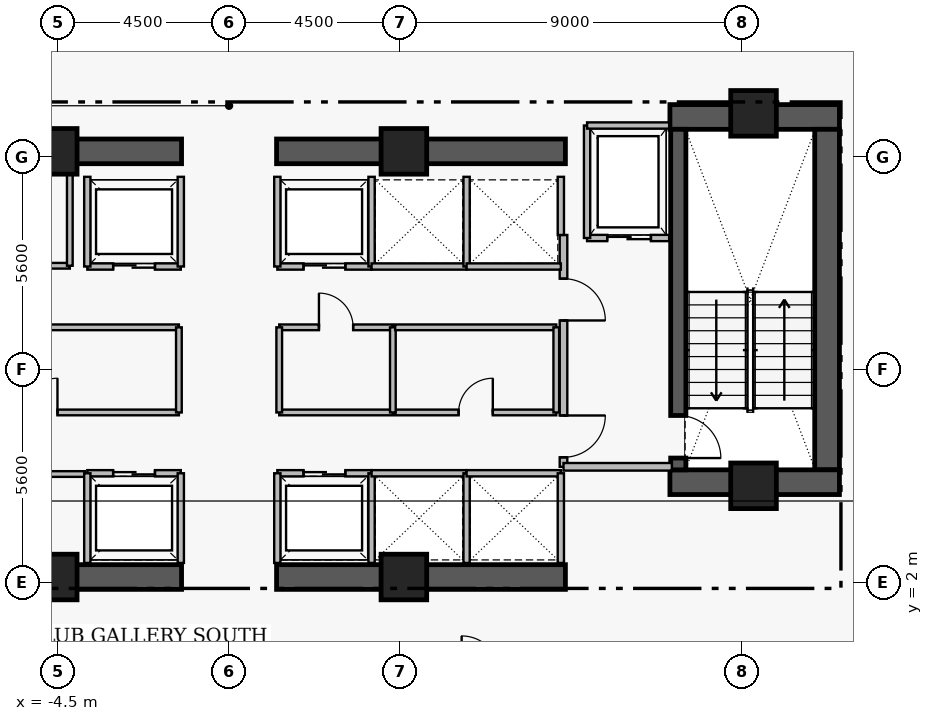
"""IFC4 building model, lengths in metres.
Left out: names, types, materials, properties, quantities, classifications, styles, units other than length and angle.
Written with IfcOpenShell. Run it as: python <this file> out.ifc"""

import sys

from ifc_helpers import new_model, si_unit, direction, frame, frame_2d, origin, origin_2d, place, context, subcontext, project, spatial, rectangle, extrude, element, fill, save


model = new_model("IFC4")
c1 = context("Model", 3, precision=1e-05, world=origin(), true_north=direction((0.0, 1.0)))
c2 = subcontext(c1, "Body", "Model", "MODEL_VIEW")
j1 = project(units=[si_unit("LENGTHUNIT", "METRE"), si_unit("PLANEANGLEUNIT", "RADIAN")], contexts=[c1])
p1 = place(None, origin())
s1 = spatial("IfcSite", under=j1, at=p1, CompositionType="ELEMENT")
p2 = place(p1, origin())
s2 = spatial("IfcBuilding", under=s1, at=p2, CompositionType="ELEMENT")
p3 = place(p2, frame((0.0, 0.0, 214.9)))
s3 = spatial("IfcBuildingStorey", under=s2, at=p3, CompositionType="ELEMENT", Elevation=214.9)
p4 = place(p3, frame((11.6, 14.255, 0.0), z_axis=(0.0, 0.0, 1.0), x_axis=(1.0, 0.0, 0.0)))
e1 = element("IfcWall", 1, at=p4, inside=s3, PredefinedType="SHEAR", context=c2, shape_type="SweptSolid", body=[
    extrude(rectangle(XDim=4.46, YDim=0.65, at=frame_2d((2.23, 0.0))), origin(), (0.0, 0.0, 1.0), 3.56),
])
p5 = place(p3, frame((15.735, 4.97, 0.0), z_axis=(0.0, 0.0, 1.0), x_axis=(0.0, 1.0, 0.0)))
e2 = element("IfcWall", 2, at=p5, inside=s3, PredefinedType="SHEAR", context=c2, shape_type="SweptSolid", body=[
    extrude(rectangle(XDim=8.96, YDim=0.65, at=frame_2d((4.48, 0.0))), origin(), (0.0, 0.0, 1.0), 3.56),
])
p6 = place(p3, frame((11.6, 4.645, 0.0), z_axis=(0.0, 0.0, 1.0), x_axis=(1.0, 0.0, 0.0)))
e3 = element("IfcWall", 3, at=p6, inside=s3, PredefinedType="SHEAR", context=c2, shape_type="SweptSolid", body=[
    extrude(rectangle(XDim=4.46, YDim=0.65, at=frame_2d((2.23, 0.0))), origin(), (0.0, 0.0, 1.0), 3.56),
])
for number, where, z_axis, x_axis in (
    (4, (-8.85, 2.15, 0.0), (0.0, 0.0, 1.0), (1.0, 0.0, 0.0)),
    (5, (1.25, 2.15, 0.0), (0.0, 0.0, 1.0), (1.0, 0.0, 0.0)),
    (6, (-8.85, 13.35, 0.0), (0.0, 0.0, 1.0), (1.0, 0.0, 0.0)),
    (7, (1.25, 13.35, 0.0), (0.0, 0.0, 1.0), (1.0, 0.0, 0.0)),
):
    element("IfcWall", number, at=place(p3, frame(where, z_axis=z_axis, x_axis=x_axis)), inside=s3, PredefinedType="SHEAR", context=c2, shape_type="SweptSolid", body=[
        extrude(rectangle(XDim=7.6, YDim=0.65, at=frame_2d((3.8, 0.0))), origin(), (0.0, 0.0, 1.0), 3.53),
    ])
p7 = place(p3, frame((11.82, 13.93, 0.0), z_axis=(0.0, 0.0, 1.0), x_axis=(0.0, -1.0, 0.0)))
e8 = element("IfcWall", 8, at=p7, inside=s3, PredefinedType="SHEAR", context=c2, shape_type="SweptSolid", body=[
    extrude(rectangle(XDim=8.96, YDim=0.4, at=frame_2d((4.48, 0.0))), origin(), (0.0, 0.0, 1.0), 3.56),
])
p8 = place(p7, frame((7.53, 0.0, 0.0)))
e9 = element("IfcOpeningElement", 9, at=p8, cuts=e8, PredefinedType="OPENING", context=c2, shape_type="SweptSolid", body=[
    extrude(rectangle(XDim=1.12, YDim=2.22, at=frame_2d((0.56, 1.11))), frame((0.0, 0.21, 0.0), z_axis=(0.0, -1.0, 0.0), x_axis=(1.0, 0.0, 0.0)), (0.0, 0.0, 1.0), 0.42),
])
for number, where, z_axis, x_axis in (
    (10, (-4.6, 13.35, 0.0), (0.0, 0.0, 1.0), (1.0, 0.0, 0.0)),
    (11, (4.6, 13.35, 0.0), (0.0, 0.0, 1.0), (1.0, 0.0, 0.0)),
    (12, (13.8, 14.35, 0.0), (0.0, 0.0, 1.0), (1.0, 0.0, 0.0)),
    (13, (-4.6, 2.15, 0.0), (0.0, 0.0, 1.0), (1.0, 0.0, 0.0)),
    (14, (4.6, 2.15, 0.0), (0.0, 0.0, 1.0), (1.0, 0.0, 0.0)),
    (15, (13.8, 4.55, 0.0), (0.0, 0.0, 1.0), (1.0, 0.0, 0.0)),
):
    element("IfcColumn", number, at=place(p3, frame(where, z_axis=z_axis, x_axis=x_axis)), inside=s3, PredefinedType="COLUMN", context=c2, shape_type="SweptSolid", body=[
        extrude(rectangle(XDim=1.2, YDim=1.2, at=origin_2d()), origin(), (0.0, 0.0, 1.0), 3.75),
    ])
p9 = place(p3, frame((8.8, 11.15, 0.0), z_axis=(0.0, 0.0, 1.0), x_axis=(0.0, -1.0, 0.0)))
e16 = element("IfcWall", 16, at=p9, inside=s3, PredefinedType="PARTITIONING", context=c2, shape_type="SweptSolid", body=[
    extrude(rectangle(XDim=6.1, YDim=0.2, at=frame_2d((3.05, 0.0))), origin(), (0.0, 0.0, 1.0), 3.53),
])
p10 = place(p9, frame((1.15, 0.0, 0.0)))
e17 = element("IfcOpeningElement", 17, at=p10, cuts=e16, PredefinedType="OPENING", context=c2, shape_type="SweptSolid", body=[
    extrude(rectangle(XDim=1.1, YDim=2.2, at=frame_2d((0.55, 1.1))), frame((0.0, 0.11, 0.0), z_axis=(0.0, -1.0, 0.0), x_axis=(1.0, 0.0, 0.0)), (0.0, 0.0, 1.0), 0.22),
])
p11 = place(p9, frame((4.75, 0.0, 0.0)))
e18 = element("IfcOpeningElement", 18, at=p11, cuts=e16, PredefinedType="OPENING", context=c2, shape_type="SweptSolid", body=[
    extrude(rectangle(XDim=1.1, YDim=2.2, at=frame_2d((0.55, 1.1))), frame((0.0, 0.11, 0.0), z_axis=(0.0, -1.0, 0.0), x_axis=(1.0, 0.0, 0.0)), (0.0, 0.0, 1.0), 0.22),
])
p12 = place(p3, frame((9.42, 11.07, 0.0), z_axis=(0.0, 0.0, 1.0), x_axis=(1.0, 0.0, 0.0)))
e19 = element("IfcWall", 19, at=p12, inside=s3, PredefinedType="PARTITIONING", context=c2, shape_type="SweptSolid", body=[
    extrude(rectangle(XDim=2.16, YDim=0.165, at=frame_2d((1.08, 0.0))), origin(), (0.0, 0.0, 1.0), 3.53),
])
p13 = place(p12, frame((0.53, 0.0, 0.0)))
e20 = element("IfcOpeningElement", 20, at=p13, cuts=e19, PredefinedType="OPENING", context=c2, shape_type="SweptSolid", body=[
    extrude(rectangle(XDim=1.15, YDim=2.25, at=frame_2d((0.575, 1.125))), frame((0.0, 0.093, 0.0), z_axis=(0.0, -1.0, 0.0), x_axis=(1.0, 0.0, 0.0)), (0.0, 0.0, 1.0), 0.185),
])
p14 = place(p3, frame((-3.73, 4.88, 0.0), z_axis=(0.0, 0.0, 1.0), x_axis=(1.0, 0.0, 0.0)))
e21 = element("IfcWall", 21, at=p14, inside=s3, PredefinedType="PARTITIONING", context=c2, shape_type="SweptSolid", body=[
    extrude(rectangle(XDim=2.46, YDim=0.165, at=frame_2d((1.23, 0.0))), origin(), (0.0, 0.0, 1.0), 3.53),
])
p15 = place(p14, frame((0.68, 0.0, 0.0)))
e22 = element("IfcOpeningElement", 22, at=p15, cuts=e21, PredefinedType="OPENING", context=c2, shape_type="SweptSolid", body=[
    extrude(rectangle(XDim=1.1, YDim=2.25, at=frame_2d((0.55, 1.125))), frame((0.0, 0.093, 0.0), z_axis=(0.0, -1.0, 0.0), x_axis=(1.0, 0.0, 0.0)), (0.0, 0.0, 1.0), 0.185),
])
p16 = place(p3, frame((1.27, 4.88, 0.0), z_axis=(0.0, 0.0, 1.0), x_axis=(1.0, 0.0, 0.0)))
e23 = element("IfcWall", 23, at=p16, inside=s3, PredefinedType="PARTITIONING", context=c2, shape_type="SweptSolid", body=[
    extrude(rectangle(XDim=2.48, YDim=0.165, at=frame_2d((1.24, 0.0))), origin(), (0.0, 0.0, 1.0), 3.53),
])
p17 = place(p16, frame((0.69, 0.0, 0.0)))
e24 = element("IfcOpeningElement", 24, at=p17, cuts=e23, PredefinedType="OPENING", context=c2, shape_type="SweptSolid", body=[
    extrude(rectangle(XDim=1.1, YDim=2.25, at=frame_2d((0.55, 1.125))), frame((0.0, 0.093, 0.0), z_axis=(0.0, -1.0, 0.0), x_axis=(1.0, 0.0, 0.0)), (0.0, 0.0, 1.0), 0.185),
])
p18 = place(p3, frame((-3.73, 10.32, 0.0), z_axis=(0.0, 0.0, 1.0), x_axis=(1.0, 0.0, 0.0)))
e25 = element("IfcWall", 25, at=p18, inside=s3, PredefinedType="PARTITIONING", context=c2, shape_type="SweptSolid", body=[
    extrude(rectangle(XDim=2.46, YDim=0.165, at=frame_2d((1.23, 0.0))), origin(), (0.0, 0.0, 1.0), 3.53),
])
p19 = place(p18, frame((0.68, 0.0, 0.0)))
e26 = element("IfcOpeningElement", 26, at=p19, cuts=e25, PredefinedType="OPENING", context=c2, shape_type="SweptSolid", body=[
    extrude(rectangle(XDim=1.1, YDim=2.25, at=frame_2d((0.55, 1.125))), frame((0.0, 0.093, 0.0), z_axis=(0.0, -1.0, 0.0), x_axis=(1.0, 0.0, 0.0)), (0.0, 0.0, 1.0), 0.185),
])
p20 = place(p3, frame((1.27, 10.32, 0.0), z_axis=(0.0, 0.0, 1.0), x_axis=(1.0, 0.0, 0.0)))
e27 = element("IfcWall", 27, at=p20, inside=s3, PredefinedType="PARTITIONING", context=c2, shape_type="SweptSolid", body=[
    extrude(rectangle(XDim=2.48, YDim=0.165, at=frame_2d((1.24, 0.0))), origin(), (0.0, 0.0, 1.0), 3.53),
])
p21 = place(p20, frame((0.69, 0.0, 0.0)))
e28 = element("IfcOpeningElement", 28, at=p21, cuts=e27, PredefinedType="OPENING", context=c2, shape_type="SweptSolid", body=[
    extrude(rectangle(XDim=1.1, YDim=2.25, at=frame_2d((0.55, 1.125))), frame((0.0, 0.093, 0.0), z_axis=(0.0, -1.0, 0.0), x_axis=(1.0, 0.0, 0.0)), (0.0, 0.0, 1.0), 0.185),
])
p22 = place(p3, frame((-8.71, 4.86, 0.0), z_axis=(0.0, 0.0, 1.0), x_axis=(1.0, 0.0, 0.0)))
e29 = element("IfcWall", 29, at=p22, inside=s3, PredefinedType="PARTITIONING", context=c2, shape_type="SweptSolid", body=[
    extrude(rectangle(XDim=4.92, YDim=0.15, at=frame_2d((2.46, 0.0))), origin(), (0.0, 0.0, 1.0), 3.53),
])
p23 = place(p22, frame((2.01, 0.0, 0.0)))
e30 = element("IfcOpeningElement", 30, at=p23, cuts=e29, PredefinedType="OPENING", context=c2, shape_type="SweptSolid", body=[
    extrude(rectangle(XDim=0.9, YDim=2.15, at=frame_2d((0.45, 1.075))), frame((0.0, 0.085, 0.0), z_axis=(0.0, -1.0, 0.0), x_axis=(1.0, 0.0, 0.0)), (0.0, 0.0, 1.0), 0.17),
])
p24 = place(p3, frame((-8.71, 10.34, 0.0), z_axis=(0.0, 0.0, 1.0), x_axis=(1.0, 0.0, 0.0)))
e31 = element("IfcWall", 31, at=p24, inside=s3, PredefinedType="PARTITIONING", context=c2, shape_type="SweptSolid", body=[
    extrude(rectangle(XDim=4.52, YDim=0.15, at=frame_2d((2.26, 0.0))), origin(), (0.0, 0.0, 1.0), 3.53),
])
p25 = place(p24, frame((1.81, 0.0, 0.0)))
e32 = element("IfcOpeningElement", 32, at=p25, cuts=e31, PredefinedType="OPENING", context=c2, shape_type="SweptSolid", body=[
    extrude(rectangle(XDim=0.9, YDim=2.15, at=frame_2d((0.45, 1.075))), frame((0.0, 0.085, 0.0), z_axis=(0.0, -1.0, 0.0), x_axis=(1.0, 0.0, 0.0)), (0.0, 0.0, 1.0), 0.17),
])
p26 = place(p3, frame((-8.61, 6.48, 0.0), z_axis=(0.0, 0.0, 1.0), x_axis=(1.0, 0.0, 0.0)))
e33 = element("IfcWall", 33, at=p26, inside=s3, PredefinedType="PARTITIONING", context=c2, shape_type="SweptSolid", body=[
    extrude(rectangle(XDim=7.29, YDim=0.15, at=frame_2d((3.645, 0.0))), origin(), (0.0, 0.0, 1.0), 3.53),
])
p27 = place(p26, frame((3.195, 0.0, 0.0)))
e34 = element("IfcOpeningElement", 34, at=p27, cuts=e33, PredefinedType="OPENING", context=c2, shape_type="SweptSolid", body=[
    extrude(rectangle(XDim=0.9, YDim=2.15, at=frame_2d((0.45, 1.075))), frame((0.0, 0.085, 0.0), z_axis=(0.0, -1.0, 0.0), x_axis=(1.0, 0.0, 0.0)), (0.0, 0.0, 1.0), 0.17),
])
p28 = place(p3, frame((1.32, 8.72, 0.0), z_axis=(0.0, 0.0, 1.0), x_axis=(1.0, 0.0, 0.0)))
e35 = element("IfcWall", 35, at=p28, inside=s3, PredefinedType="PARTITIONING", context=c2, shape_type="SweptSolid", body=[
    extrude(rectangle(XDim=2.99, YDim=0.15, at=frame_2d((1.495, 0.0))), origin(), (0.0, 0.0, 1.0), 3.53),
])
p29 = place(p28, frame((1.045, 0.0, 0.0)))
e36 = element("IfcOpeningElement", 36, at=p29, cuts=e35, PredefinedType="OPENING", context=c2, shape_type="SweptSolid", body=[
    extrude(rectangle(XDim=0.9, YDim=2.15, at=frame_2d((0.45, 1.075))), frame((0.0, 0.085, 0.0), z_axis=(0.0, -1.0, 0.0), x_axis=(1.0, 0.0, 0.0)), (0.0, 0.0, 1.0), 0.17),
])
p30 = place(p3, frame((4.37, 6.48, 0.0), z_axis=(0.0, 0.0, 1.0), x_axis=(1.0, 0.0, 0.0)))
e37 = element("IfcWall", 37, at=p30, inside=s3, PredefinedType="PARTITIONING", context=c2, shape_type="SweptSolid", body=[
    extrude(rectangle(XDim=4.24, YDim=0.15, at=frame_2d((2.12, 0.0))), origin(), (0.0, 0.0, 1.0), 3.53),
])
p31 = place(p30, frame((1.67, 0.0, 0.0)))
e38 = element("IfcOpeningElement", 38, at=p31, cuts=e37, PredefinedType="OPENING", context=c2, shape_type="SweptSolid", body=[
    extrude(rectangle(XDim=0.9, YDim=2.15, at=frame_2d((0.45, 1.075))), frame((0.0, 0.085, 0.0), z_axis=(0.0, -1.0, 0.0), x_axis=(1.0, 0.0, 0.0)), (0.0, 0.0, 1.0), 0.17),
])
p32 = place(p3, frame((8.8, 5.05, 0.0), z_axis=(0.0, 0.0, 1.0), x_axis=(1.0, 0.0, 0.0)))
e39 = element("IfcWall", 39, at=p32, inside=s3, PredefinedType="PARTITIONING", context=c2, shape_type="SweptSolid", body=[
    extrude(rectangle(XDim=2.85, YDim=0.2, at=frame_2d((1.425, 0.0))), origin(), (0.0, 0.0, 1.0), 3.53),
])
p33 = place(p3, frame((9.42, 11.07, 0.0), z_axis=(0.0, 0.0, 1.0), x_axis=(0.0, 1.0, 0.0)))
e40 = element("IfcWall", 40, at=p33, inside=s3, PredefinedType="PARTITIONING", context=c2, shape_type="SweptSolid", body=[
    extrude(rectangle(XDim=2.96, YDim=0.165, at=frame_2d((1.48, 0.0))), origin(), (0.0, 0.0, 1.0), 3.53),
])
p34 = place(p3, frame((9.42, 14.03, 0.0), z_axis=(0.0, 0.0, 1.0), x_axis=(1.0, 0.0, 0.0)))
e41 = element("IfcWall", 41, at=p34, inside=s3, PredefinedType="PARTITIONING", context=c2, shape_type="SweptSolid", body=[
    extrude(rectangle(XDim=2.16, YDim=0.165, at=frame_2d((1.08, 0.0))), origin(), (0.0, 0.0, 1.0), 3.53),
])
for number, where, z_axis, x_axis in (
    (42, (-3.73, 2.52, 0.0), (0.0, 0.0, 1.0), (0.0, 1.0, 0.0)),
    (43, (-1.27, 2.52, 0.0), (0.0, 0.0, 1.0), (0.0, 1.0, 0.0)),
    (44, (1.27, 2.52, 0.0), (0.0, 0.0, 1.0), (0.0, 1.0, 0.0)),
    (45, (3.75, 2.52, 0.0), (0.0, 0.0, 1.0), (0.0, 1.0, 0.0)),
    (46, (-3.73, 10.32, 0.0), (0.0, 0.0, 1.0), (0.0, 1.0, 0.0)),
    (47, (-1.27, 10.32, 0.0), (0.0, 0.0, 1.0), (0.0, 1.0, 0.0)),
    (48, (1.27, 10.32, 0.0), (0.0, 0.0, 1.0), (0.0, 1.0, 0.0)),
    (49, (3.75, 10.32, 0.0), (0.0, 0.0, 1.0), (0.0, 1.0, 0.0)),
):
    element("IfcWall", number, at=place(p3, frame(where, z_axis=z_axis, x_axis=x_axis)), inside=s3, PredefinedType="PARTITIONING", context=c2, shape_type="SweptSolid", body=[
        extrude(rectangle(XDim=2.36, YDim=0.165, at=frame_2d((1.18, 0.0))), origin(), (0.0, 0.0, 1.0), 3.53),
    ])
p35 = place(p3, frame((3.75, 4.88, 0.0), z_axis=(0.0, 0.0, 1.0), x_axis=(1.0, 0.0, 0.0)))
e50 = element("IfcWall", 50, at=p35, inside=s3, PredefinedType="PARTITIONING", context=c2, shape_type="SweptSolid", body=[
    extrude(rectangle(XDim=2.5, YDim=0.165, at=frame_2d((1.25, 0.0))), origin(), (0.0, 0.0, 1.0), 3.53),
])
p36 = place(p3, frame((6.25, 2.52, 0.0), z_axis=(0.0, 0.0, 1.0), x_axis=(0.0, 1.0, 0.0)))
e51 = element("IfcWall", 51, at=p36, inside=s3, PredefinedType="PARTITIONING", context=c2, shape_type="SweptSolid", body=[
    extrude(rectangle(XDim=2.36, YDim=0.165, at=frame_2d((1.18, 0.0))), origin(), (0.0, 0.0, 1.0), 3.53),
])
p37 = place(p3, frame((6.25, 4.88, 0.0), z_axis=(0.0, 0.0, 1.0), x_axis=(1.0, 0.0, 0.0)))
e52 = element("IfcWall", 52, at=p37, inside=s3, PredefinedType="PARTITIONING", context=c2, shape_type="SweptSolid", body=[
    extrude(rectangle(XDim=2.48, YDim=0.165, at=frame_2d((1.24, 0.0))), origin(), (0.0, 0.0, 1.0), 3.53),
])
p38 = place(p3, frame((8.73, 2.52, 0.0), z_axis=(0.0, 0.0, 1.0), x_axis=(0.0, 1.0, 0.0)))
e53 = element("IfcWall", 53, at=p38, inside=s3, PredefinedType="PARTITIONING", context=c2, shape_type="SweptSolid", body=[
    extrude(rectangle(XDim=2.36, YDim=0.165, at=frame_2d((1.18, 0.0))), origin(), (0.0, 0.0, 1.0), 3.53),
])
p39 = place(p3, frame((3.75, 10.32, 0.0), z_axis=(0.0, 0.0, 1.0), x_axis=(1.0, 0.0, 0.0)))
e54 = element("IfcWall", 54, at=p39, inside=s3, PredefinedType="PARTITIONING", context=c2, shape_type="SweptSolid", body=[
    extrude(rectangle(XDim=2.5, YDim=0.165, at=frame_2d((1.25, 0.0))), origin(), (0.0, 0.0, 1.0), 3.53),
])
p40 = place(p3, frame((6.25, 10.32, 0.0), z_axis=(0.0, 0.0, 1.0), x_axis=(0.0, 1.0, 0.0)))
e55 = element("IfcWall", 55, at=p40, inside=s3, PredefinedType="PARTITIONING", context=c2, shape_type="SweptSolid", body=[
    extrude(rectangle(XDim=2.36, YDim=0.165, at=frame_2d((1.18, 0.0))), origin(), (0.0, 0.0, 1.0), 3.53),
])
p41 = place(p3, frame((6.25, 10.32, 0.0), z_axis=(0.0, 0.0, 1.0), x_axis=(1.0, 0.0, 0.0)))
e56 = element("IfcWall", 56, at=p41, inside=s3, PredefinedType="PARTITIONING", context=c2, shape_type="SweptSolid", body=[
    extrude(rectangle(XDim=2.48, YDim=0.165, at=frame_2d((1.24, 0.0))), origin(), (0.0, 0.0, 1.0), 3.53),
])
p42 = place(p3, frame((8.73, 11.15, 0.0), z_axis=(0.0, 0.0, 1.0), x_axis=(0.0, 1.0, 0.0)))
e57 = element("IfcWall", 57, at=p42, inside=s3, PredefinedType="PARTITIONING", context=c2, shape_type="SweptSolid", body=[
    extrude(rectangle(XDim=1.53, YDim=0.165, at=frame_2d((0.765, 0.0))), origin(), (0.0, 0.0, 1.0), 3.53),
])
p43 = place(p3, frame((-4.19, 10.34, 0.0), z_axis=(0.0, 0.0, 1.0), x_axis=(0.0, 1.0, 0.0)))
e58 = element("IfcWall", 58, at=p43, inside=s3, PredefinedType="PARTITIONING", context=c2, shape_type="SweptSolid", body=[
    extrude(rectangle(XDim=2.52, YDim=0.15, at=frame_2d((1.26, 0.0))), origin(), (0.0, 0.0, 1.0), 3.53),
])
p44 = place(p3, frame((-8.61, 8.72, 0.0), z_axis=(0.0, 0.0, 1.0), x_axis=(1.0, 0.0, 0.0)))
e59 = element("IfcWall", 59, at=p44, inside=s3, PredefinedType="PARTITIONING", context=c2, shape_type="SweptSolid", body=[
    extrude(rectangle(XDim=7.29, YDim=0.15, at=frame_2d((3.645, 0.0))), origin(), (0.0, 0.0, 1.0), 3.53),
])
p45 = place(p3, frame((-1.32, 6.48, 0.0), z_axis=(0.0, 0.0, 1.0), x_axis=(0.0, 1.0, 0.0)))
e60 = element("IfcWall", 60, at=p45, inside=s3, PredefinedType="PARTITIONING", context=c2, shape_type="SweptSolid", body=[
    extrude(rectangle(XDim=2.24, YDim=0.15, at=frame_2d((1.12, 0.0))), origin(), (0.0, 0.0, 1.0), 3.53),
])
p46 = place(p3, frame((1.32, 6.48, 0.0), z_axis=(0.0, 0.0, 1.0), x_axis=(1.0, 0.0, 0.0)))
e61 = element("IfcWall", 61, at=p46, inside=s3, PredefinedType="PARTITIONING", context=c2, shape_type="SweptSolid", body=[
    extrude(rectangle(XDim=2.99, YDim=0.15, at=frame_2d((1.495, 0.0))), origin(), (0.0, 0.0, 1.0), 3.53),
])
for number, where, z_axis, x_axis in (
    (62, (1.32, 6.48, 0.0), (0.0, 0.0, 1.0), (0.0, 1.0, 0.0)),
    (63, (4.31, 6.48, 0.0), (0.0, 0.0, 1.0), (0.0, 1.0, 0.0)),
):
    element("IfcWall", number, at=place(p3, frame(where, z_axis=z_axis, x_axis=x_axis)), inside=s3, PredefinedType="PARTITIONING", context=c2, shape_type="SweptSolid", body=[
        extrude(rectangle(XDim=2.24, YDim=0.15, at=frame_2d((1.12, 0.0))), origin(), (0.0, 0.0, 1.0), 3.53),
    ])
p47 = place(p3, frame((4.37, 8.72, 0.0), z_axis=(0.0, 0.0, 1.0), x_axis=(1.0, 0.0, 0.0)))
e64 = element("IfcWall", 64, at=p47, inside=s3, PredefinedType="PARTITIONING", context=c2, shape_type="SweptSolid", body=[
    extrude(rectangle(XDim=4.24, YDim=0.15, at=frame_2d((2.12, 0.0))), origin(), (0.0, 0.0, 1.0), 3.53),
])
p48 = place(p3, frame((8.61, 6.48, 0.0), z_axis=(0.0, 0.0, 1.0), x_axis=(0.0, 1.0, 0.0)))
e65 = element("IfcWall", 65, at=p48, inside=s3, PredefinedType="PARTITIONING", context=c2, shape_type="SweptSolid", body=[
    extrude(rectangle(XDim=2.24, YDim=0.15, at=frame_2d((1.12, 0.0))), origin(), (0.0, 0.0, 1.0), 3.53),
])
p49 = place(p8, origin())
e66 = element("IfcDoor", 66, at=p49, inside=s3, OperationType="SINGLE_SWING_RIGHT", PredefinedType="DOOR", context=c2, shape_type="SweptSolid", body=[
    extrude(rectangle(XDim=1.12, YDim=2.22, at=frame_2d((0.56, 1.11))), frame((0.0, 0.025, 0.0), z_axis=(0.0, -1.0, 0.0), x_axis=(1.0, 0.0, 0.0)), (0.0, 0.0, 1.0), 0.05),
])
fill(e9, e66)
p50 = place(p10, origin())
e67 = element("IfcDoor", 67, at=p50, inside=s3, OperationType="SINGLE_SWING_RIGHT", PredefinedType="DOOR", context=c2, shape_type="SweptSolid", body=[
    extrude(rectangle(XDim=1.1, YDim=2.2, at=frame_2d((0.55, 1.1))), frame((0.0, 0.025, 0.0), z_axis=(0.0, -1.0, 0.0), x_axis=(1.0, 0.0, 0.0)), (0.0, 0.0, 1.0), 0.05),
])
fill(e17, e67)
p51 = place(p11, origin())
e68 = element("IfcDoor", 68, at=p51, inside=s3, OperationType="SINGLE_SWING_LEFT", PredefinedType="DOOR", context=c2, shape_type="SweptSolid", body=[
    extrude(rectangle(XDim=1.1, YDim=2.2, at=frame_2d((0.55, 1.1))), frame((0.0, 0.025, 0.0), z_axis=(0.0, -1.0, 0.0), x_axis=(1.0, 0.0, 0.0)), (0.0, 0.0, 1.0), 0.05),
])
fill(e18, e68)
p52 = place(p13, origin())
e69 = element("IfcDoor", 69, at=p52, inside=s3, OperationType="SLIDING_TO_LEFT", PredefinedType="DOOR", context=c2, shape_type="SweptSolid", body=[
    extrude(rectangle(XDim=1.15, YDim=2.25, at=frame_2d((0.575, 1.125))), frame((0.0, 0.025, 0.0), z_axis=(0.0, -1.0, 0.0), x_axis=(1.0, 0.0, 0.0)), (0.0, 0.0, 1.0), 0.05),
])
fill(e20, e69)
p53 = place(p15, origin())
e70 = element("IfcDoor", 70, at=p53, inside=s3, OperationType="SLIDING_TO_LEFT", PredefinedType="DOOR", context=c2, shape_type="SweptSolid", body=[
    extrude(rectangle(XDim=1.1, YDim=2.25, at=frame_2d((0.55, 1.125))), frame((0.0, 0.025, 0.0), z_axis=(0.0, -1.0, 0.0), x_axis=(1.0, 0.0, 0.0)), (0.0, 0.0, 1.0), 0.05),
])
fill(e22, e70)
p54 = place(p17, origin())
e71 = element("IfcDoor", 71, at=p54, inside=s3, OperationType="SLIDING_TO_LEFT", PredefinedType="DOOR", context=c2, shape_type="SweptSolid", body=[
    extrude(rectangle(XDim=1.1, YDim=2.25, at=frame_2d((0.55, 1.125))), frame((0.0, 0.025, 0.0), z_axis=(0.0, -1.0, 0.0), x_axis=(1.0, 0.0, 0.0)), (0.0, 0.0, 1.0), 0.05),
])
fill(e24, e71)
p55 = place(p19, origin())
e72 = element("IfcDoor", 72, at=p55, inside=s3, OperationType="SLIDING_TO_LEFT", PredefinedType="DOOR", context=c2, shape_type="SweptSolid", body=[
    extrude(rectangle(XDim=1.1, YDim=2.25, at=frame_2d((0.55, 1.125))), frame((0.0, 0.025, 0.0), z_axis=(0.0, -1.0, 0.0), x_axis=(1.0, 0.0, 0.0)), (0.0, 0.0, 1.0), 0.05),
])
fill(e26, e72)
p56 = place(p21, origin())
e73 = element("IfcDoor", 73, at=p56, inside=s3, OperationType="SLIDING_TO_LEFT", PredefinedType="DOOR", context=c2, shape_type="SweptSolid", body=[
    extrude(rectangle(XDim=1.1, YDim=2.25, at=frame_2d((0.55, 1.125))), frame((0.0, 0.025, 0.0), z_axis=(0.0, -1.0, 0.0), x_axis=(1.0, 0.0, 0.0)), (0.0, 0.0, 1.0), 0.05),
])
fill(e28, e73)
p57 = place(p27, origin())
e74 = element("IfcDoor", 74, at=p57, inside=s3, OperationType="SINGLE_SWING_RIGHT", PredefinedType="DOOR", context=c2, shape_type="SweptSolid", body=[
    extrude(rectangle(XDim=0.9, YDim=2.15, at=frame_2d((0.45, 1.075))), frame((0.0, 0.025, 0.0), z_axis=(0.0, -1.0, 0.0), x_axis=(1.0, 0.0, 0.0)), (0.0, 0.0, 1.0), 0.05),
])
fill(e34, e74)
p58 = place(p29, origin())
e75 = element("IfcDoor", 75, at=p58, inside=s3, OperationType="SINGLE_SWING_LEFT", PredefinedType="DOOR", context=c2, shape_type="SweptSolid", body=[
    extrude(rectangle(XDim=0.9, YDim=2.15, at=frame_2d((0.45, 1.075))), frame((0.0, 0.025, 0.0), z_axis=(0.0, -1.0, 0.0), x_axis=(1.0, 0.0, 0.0)), (0.0, 0.0, 1.0), 0.05),
])
fill(e36, e75)
p59 = place(p31, origin())
e76 = element("IfcDoor", 76, at=p59, inside=s3, OperationType="SINGLE_SWING_RIGHT", PredefinedType="DOOR", context=c2, shape_type="SweptSolid", body=[
    extrude(rectangle(XDim=0.9, YDim=2.15, at=frame_2d((0.45, 1.075))), frame((0.0, 0.025, 0.0), z_axis=(0.0, -1.0, 0.0), x_axis=(1.0, 0.0, 0.0)), (0.0, 0.0, 1.0), 0.05),
])
fill(e38, e76)
save(model, sys.argv[1])
